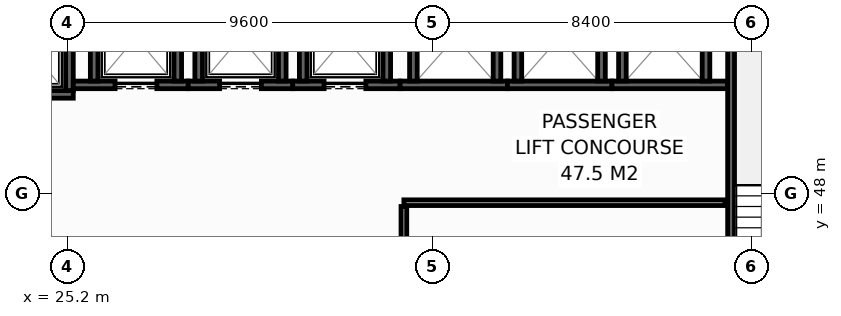
"""IFC4 building model, lengths in metres.
Left out: names, types, materials, properties, quantities, classifications, styles, units other than length and angle.
Written with IfcOpenShell. Run it as: python <this file> out.ifc"""

import sys

from ifc_helpers import new_model, si_unit, direction, frame, frame_2d, origin, place, context, subcontext, project, spatial, rectangle, extrude, element, fill, save


model = new_model("IFC4")
c1 = context("Model", 3, precision=1e-05, world=origin(), true_north=direction((0.0, 1.0)))
c2 = subcontext(c1, "Body", "Model", "MODEL_VIEW")
j1 = project(units=[si_unit("LENGTHUNIT", "METRE"), si_unit("PLANEANGLEUNIT", "RADIAN")], contexts=[c1])
p1 = place(None, origin())
s1 = spatial("IfcSite", under=j1, at=p1, CompositionType="ELEMENT")
p2 = place(p1, origin())
s2 = spatial("IfcBuilding", under=s1, at=p2, CompositionType="ELEMENT")
p3 = place(p2, frame((0.0, 0.0, 47.2)))
s3 = spatial("IfcBuildingStorey", under=s2, at=p3, CompositionType="ELEMENT", Elevation=47.2)
p4 = place(p3, frame((22.5, 50.6, 0.0), z_axis=(0.0, 0.0, 1.0), x_axis=(1.0, 0.0, 0.0)))
e1 = element("IfcWall", 1, at=p4, inside=s3, PredefinedType="SHEAR", context=c2, shape_type="SweptSolid", body=[
    extrude(rectangle(XDim=2.85, YDim=0.2, at=frame_2d((1.425, 0.0))), origin(), (0.0, 0.0, 1.0), 4.15),
])
p5 = place(p4, frame((0.925, 0.0, 0.0)))
e2 = element("IfcOpeningElement", 2, at=p5, cuts=e1, PredefinedType="OPENING", context=c2, shape_type="SweptSolid", body=[
    extrude(rectangle(XDim=1.25, YDim=2.3, at=frame_2d((0.625, 1.15))), frame((0.0, 0.11, 0.0), z_axis=(0.0, -1.0, 0.0), x_axis=(1.0, 0.0, 0.0)), (0.0, 0.0, 1.0), 0.22),
])
p6 = place(p3, frame((25.25, 50.7, 0.0), z_axis=(0.0, 0.0, 1.0), x_axis=(0.0, 1.0, 0.0)))
e3 = element("IfcWall", 3, at=p6, inside=s3, PredefinedType="SHEAR", context=c2, shape_type="SweptSolid", body=[
    extrude(rectangle(XDim=2.6, YDim=0.2, at=frame_2d((1.3, 0.0))), origin(), (0.0, 0.0, 1.0), 4.15),
])
p7 = place(p3, frame((25.35, 50.85, 0.0), z_axis=(0.0, 0.0, 1.0), x_axis=(1.0, 0.0, 0.0)))
e4 = element("IfcWall", 4, at=p7, inside=s3, PredefinedType="SHEAR", context=c2, shape_type="SweptSolid", body=[
    extrude(rectangle(XDim=3.025, YDim=0.2, at=frame_2d((1.512, 0.0))), origin(), (0.0, 0.0, 1.0), 4.15),
])
p8 = place(p7, frame((1.1, 0.0, 0.0)))
e5 = element("IfcOpeningElement", 5, at=p8, cuts=e4, PredefinedType="OPENING", context=c2, shape_type="SweptSolid", body=[
    extrude(rectangle(XDim=1.1, YDim=2.2, at=frame_2d((0.55, 1.1))), frame((0.0, 0.11, 0.0), z_axis=(0.0, -1.0, 0.0), x_axis=(1.0, 0.0, 0.0)), (0.0, 0.0, 1.0), 0.22),
])
for number, where, z_axis, x_axis in (
    (6, (25.9, 50.95, 0.0), (0.0, 0.0, 1.0), (0.0, 1.0, 0.0)),
    (7, (28.1, 50.95, 0.0), (0.0, 0.0, 1.0), (0.0, 1.0, 0.0)),
):
    element("IfcWall", number, at=place(p3, frame(where, z_axis=z_axis, x_axis=x_axis)), inside=s3, PredefinedType="SHEAR", context=c2, shape_type="SweptSolid", body=[
        extrude(rectangle(XDim=2.3, YDim=0.2, at=frame_2d((1.15, 0.0))), origin(), (0.0, 0.0, 1.0), 4.15),
    ])
p9 = place(p3, frame((28.375, 50.85, 0.0), z_axis=(0.0, 0.0, 1.0), x_axis=(1.0, 0.0, 0.0)))
e8 = element("IfcWall", 8, at=p9, inside=s3, PredefinedType="SHEAR", context=c2, shape_type="SweptSolid", body=[
    extrude(rectangle(XDim=2.75, YDim=0.2, at=frame_2d((1.375, 0.0))), origin(), (0.0, 0.0, 1.0), 4.15),
])
p10 = place(p9, frame((0.825, 0.0, 0.0)))
e9 = element("IfcOpeningElement", 9, at=p10, cuts=e8, PredefinedType="OPENING", context=c2, shape_type="SweptSolid", body=[
    extrude(rectangle(XDim=1.1, YDim=2.2, at=frame_2d((0.55, 1.1))), frame((0.0, 0.11, 0.0), z_axis=(0.0, -1.0, 0.0), x_axis=(1.0, 0.0, 0.0)), (0.0, 0.0, 1.0), 0.22),
])
for number, where, z_axis, x_axis in (
    (10, (28.65, 50.95, 0.0), (0.0, 0.0, 1.0), (0.0, 1.0, 0.0)),
    (11, (30.85, 50.95, 0.0), (0.0, 0.0, 1.0), (0.0, 1.0, 0.0)),
):
    element("IfcWall", number, at=place(p3, frame(where, z_axis=z_axis, x_axis=x_axis)), inside=s3, PredefinedType="SHEAR", context=c2, shape_type="SweptSolid", body=[
        extrude(rectangle(XDim=2.3, YDim=0.2, at=frame_2d((1.15, 0.0))), origin(), (0.0, 0.0, 1.0), 4.15),
    ])
p11 = place(p3, frame((31.125, 50.85, 0.0), z_axis=(0.0, 0.0, 1.0), x_axis=(1.0, 0.0, 0.0)))
e12 = element("IfcWall", 12, at=p11, inside=s3, PredefinedType="SHEAR", context=c2, shape_type="SweptSolid", body=[
    extrude(rectangle(XDim=2.825, YDim=0.2, at=frame_2d((1.413, 0.0))), origin(), (0.0, 0.0, 1.0), 4.15),
])
p12 = place(p11, frame((0.825, 0.0, 0.0)))
e13 = element("IfcOpeningElement", 13, at=p12, cuts=e12, PredefinedType="OPENING", context=c2, shape_type="SweptSolid", body=[
    extrude(rectangle(XDim=1.1, YDim=2.2, at=frame_2d((0.55, 1.1))), frame((0.0, 0.11, 0.0), z_axis=(0.0, -1.0, 0.0), x_axis=(1.0, 0.0, 0.0)), (0.0, 0.0, 1.0), 0.22),
])
for number, where, z_axis, x_axis in (
    (14, (31.4, 50.95, 0.0), (0.0, 0.0, 1.0), (0.0, 1.0, 0.0)),
    (15, (33.6, 50.95, 0.0), (0.0, 0.0, 1.0), (0.0, 1.0, 0.0)),
):
    element("IfcWall", number, at=place(p3, frame(where, z_axis=z_axis, x_axis=x_axis)), inside=s3, PredefinedType="SHEAR", context=c2, shape_type="SweptSolid", body=[
        extrude(rectangle(XDim=2.3, YDim=0.2, at=frame_2d((1.15, 0.0))), origin(), (0.0, 0.0, 1.0), 4.15),
    ])
p13 = place(p3, frame((33.95, 50.85, 0.0), z_axis=(0.0, 0.0, 1.0), x_axis=(1.0, 0.0, 0.0)))
e16 = element("IfcWall", 16, at=p13, inside=s3, PredefinedType="SHEAR", context=c2, shape_type="SweptSolid", body=[
    extrude(rectangle(XDim=2.825, YDim=0.2, at=frame_2d((1.413, 0.0))), origin(), (0.0, 0.0, 1.0), 4.15),
])
for number, where, z_axis, x_axis in (
    (17, (34.3, 50.95, 0.0), (0.0, 0.0, 1.0), (0.0, 1.0, 0.0)),
    (18, (36.5, 50.95, 0.0), (0.0, 0.0, 1.0), (0.0, 1.0, 0.0)),
):
    element("IfcWall", number, at=place(p3, frame(where, z_axis=z_axis, x_axis=x_axis)), inside=s3, PredefinedType="SHEAR", context=c2, shape_type="SweptSolid", body=[
        extrude(rectangle(XDim=2.3, YDim=0.2, at=frame_2d((1.15, 0.0))), origin(), (0.0, 0.0, 1.0), 4.15),
    ])
p14 = place(p3, frame((36.775, 50.85, 0.0), z_axis=(0.0, 0.0, 1.0), x_axis=(1.0, 0.0, 0.0)))
e19 = element("IfcWall", 19, at=p14, inside=s3, PredefinedType="SHEAR", context=c2, shape_type="SweptSolid", body=[
    extrude(rectangle(XDim=2.75, YDim=0.2, at=frame_2d((1.375, 0.0))), origin(), (0.0, 0.0, 1.0), 4.15),
])
for number, where, z_axis, x_axis in (
    (20, (37.05, 50.95, 0.0), (0.0, 0.0, 1.0), (0.0, 1.0, 0.0)),
    (21, (39.25, 50.95, 0.0), (0.0, 0.0, 1.0), (0.0, 1.0, 0.0)),
):
    element("IfcWall", number, at=place(p3, frame(where, z_axis=z_axis, x_axis=x_axis)), inside=s3, PredefinedType="SHEAR", context=c2, shape_type="SweptSolid", body=[
        extrude(rectangle(XDim=2.3, YDim=0.2, at=frame_2d((1.15, 0.0))), origin(), (0.0, 0.0, 1.0), 4.15),
    ])
p15 = place(p3, frame((39.525, 50.85, 0.0), z_axis=(0.0, 0.0, 1.0), x_axis=(1.0, 0.0, 0.0)))
e22 = element("IfcWall", 22, at=p15, inside=s3, PredefinedType="SHEAR", context=c2, shape_type="SweptSolid", body=[
    extrude(rectangle(XDim=3.045, YDim=0.2, at=frame_2d((1.522, 0.0))), origin(), (0.0, 0.0, 1.0), 4.15),
])
for number, where, z_axis, x_axis in (
    (23, (39.8, 50.95, 0.0), (0.0, 0.0, 1.0), (0.0, 1.0, 0.0)),
    (24, (42.0, 50.95, 0.0), (0.0, 0.0, 1.0), (0.0, 1.0, 0.0)),
):
    element("IfcWall", number, at=place(p3, frame(where, z_axis=z_axis, x_axis=x_axis)), inside=s3, PredefinedType="SHEAR", context=c2, shape_type="SweptSolid", body=[
        extrude(rectangle(XDim=2.3, YDim=0.2, at=frame_2d((1.15, 0.0))), origin(), (0.0, 0.0, 1.0), 4.15),
    ])
p16 = place(p3, frame((42.66, 53.8, 0.0), z_axis=(0.0, 0.0, 1.0), x_axis=(0.0, -1.0, 0.0)))
e25 = element("IfcWall", 25, at=p16, inside=s3, PredefinedType="SHEAR", context=c2, shape_type="SweptSolid", body=[
    extrude(rectangle(XDim=10.4, YDim=0.18, at=frame_2d((5.2, 0.0))), origin(), (0.0, 0.0, 1.0), 4.15),
])
p17 = place(p16, frame((8.99, 0.0, 0.0)))
e26 = element("IfcOpeningElement", 26, at=p17, cuts=e25, PredefinedType="OPENING", context=c2, shape_type="SweptSolid", body=[
    extrude(rectangle(XDim=1.1, YDim=2.15, at=frame_2d((0.55, 1.075))), frame((0.0, 0.1, 0.0), z_axis=(0.0, -1.0, 0.0), x_axis=(1.0, 0.0, 0.0)), (0.0, 0.0, 1.0), 0.2),
])
p18 = place(p3, frame((34.05, 47.75, 0.0), z_axis=(0.0, 0.0, 1.0), x_axis=(1.0, 0.0, 0.0)))
e27 = element("IfcWall", 27, at=p18, inside=s3, PredefinedType="PARTITIONING", context=c2, shape_type="SweptSolid", body=[
    extrude(rectangle(XDim=8.45, YDim=0.15, at=frame_2d((4.225, 0.0))), origin(), (0.0, 0.0, 1.0), 4.15),
])
p19 = place(p3, frame((34.05, 45.22, 0.0), z_axis=(0.0, 0.0, 1.0), x_axis=(0.0, 1.0, 0.0)))
e28 = element("IfcWall", 28, at=p19, inside=s3, PredefinedType="PARTITIONING", context=c2, shape_type="SweptSolid", body=[
    extrude(rectangle(XDim=2.43, YDim=0.15, at=frame_2d((1.215, 0.0))), origin(), (0.0, 0.0, 1.0), 4.15),
])
p20 = place(p8, origin())
e29 = element("IfcDoor", 29, at=p20, inside=s3, OperationType="SLIDING_TO_LEFT", PredefinedType="DOOR", context=c2, shape_type="SweptSolid", body=[
    extrude(rectangle(XDim=1.1, YDim=2.2, at=frame_2d((0.55, 1.1))), frame((0.0, 0.025, 0.0), z_axis=(0.0, -1.0, 0.0), x_axis=(1.0, 0.0, 0.0)), (0.0, 0.0, 1.0), 0.05),
])
fill(e5, e29)
p21 = place(p10, origin())
e30 = element("IfcDoor", 30, at=p21, inside=s3, OperationType="SLIDING_TO_LEFT", PredefinedType="DOOR", context=c2, shape_type="SweptSolid", body=[
    extrude(rectangle(XDim=1.1, YDim=2.2, at=frame_2d((0.55, 1.1))), frame((0.0, 0.025, 0.0), z_axis=(0.0, -1.0, 0.0), x_axis=(1.0, 0.0, 0.0)), (0.0, 0.0, 1.0), 0.05),
])
fill(e9, e30)
p22 = place(p12, origin())
e31 = element("IfcDoor", 31, at=p22, inside=s3, OperationType="SLIDING_TO_LEFT", PredefinedType="DOOR", context=c2, shape_type="SweptSolid", body=[
    extrude(rectangle(XDim=1.1, YDim=2.2, at=frame_2d((0.55, 1.1))), frame((0.0, 0.025, 0.0), z_axis=(0.0, -1.0, 0.0), x_axis=(1.0, 0.0, 0.0)), (0.0, 0.0, 1.0), 0.05),
])
fill(e13, e31)
save(model, sys.argv[1])
